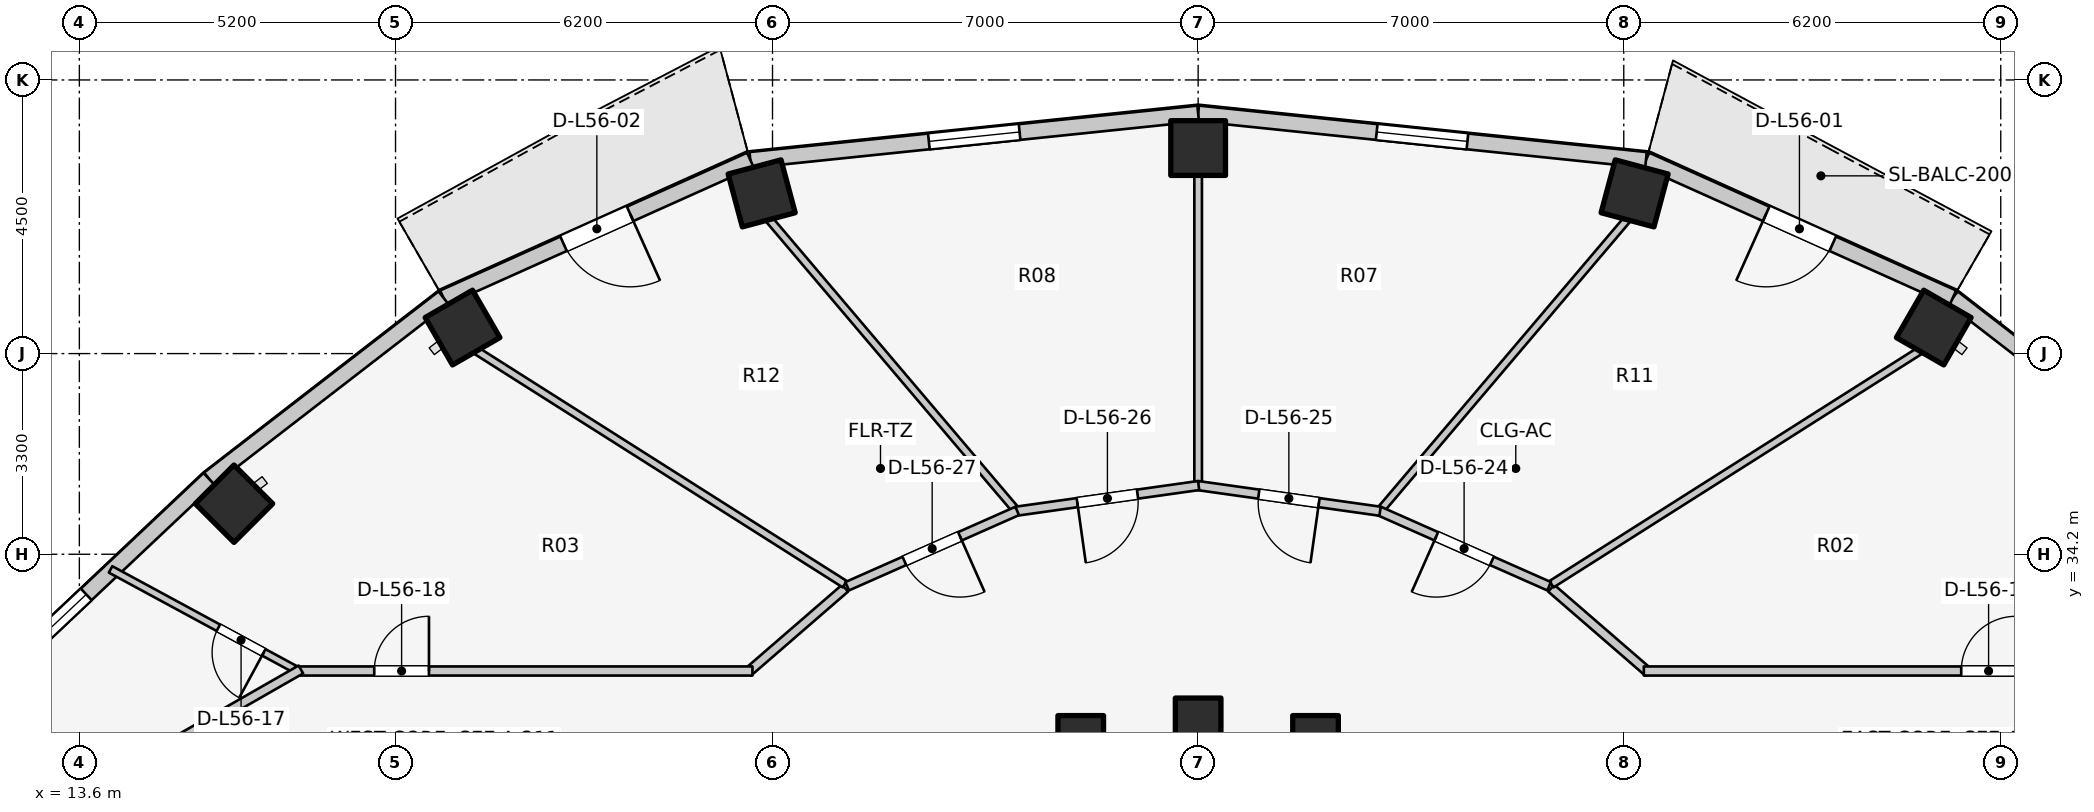
"""IFC4 building model, lengths in metres.
Left out: names, types, materials, properties, quantities, classifications, styles, units other than length and angle.
Written with IfcOpenShell. Run it as: python <this file> out.ifc"""

import sys

from ifc_helpers import new_model, si_unit, direction, frame, frame_2d, origin, origin_2d, place, context, subcontext, project, spatial, rectangle, extrude, element, fill, save


model = new_model("IFC4")
c1 = context("Model", 3, precision=1e-05, world=origin(), true_north=direction((0.0, 1.0)))
c2 = subcontext(c1, "Body", "Model", "MODEL_VIEW")
j1 = project(units=[si_unit("LENGTHUNIT", "METRE"), si_unit("PLANEANGLEUNIT", "RADIAN")], contexts=[c1])
p1 = place(None, origin())
s1 = spatial("IfcSite", under=j1, at=p1, CompositionType="ELEMENT")
p2 = place(p1, origin())
s2 = spatial("IfcBuilding", under=s1, at=p2, CompositionType="ELEMENT")
p3 = place(p2, frame((0.0, 0.0, 183.9)))
s3 = spatial("IfcBuildingStorey", under=s2, at=p3, CompositionType="ELEMENT", Elevation=183.9)
p4 = place(p3, frame((44.098, 37.928, 0.0), z_axis=(0.0, 0.0, 1.0), x_axis=(0.5, 0.866025403784, 0.0)))
e1 = element("IfcColumn", 1, at=p4, inside=s3, PredefinedType="COLUMN", context=c2, shape_type="SweptSolid", body=[
    extrude(rectangle(XDim=0.9, YDim=0.9, at=origin_2d()), origin(), (0.0, 0.0, 1.0), 3.1),
])
p5 = place(p3, frame((33.931, 31.172, 0.0), z_axis=(0.0, 0.0, 1.0), x_axis=(1.0, 0.0, 0.0)))
e2 = element("IfcColumn", 2, at=p5, inside=s3, PredefinedType="COLUMN", context=c2, shape_type="SweptSolid", body=[
    extrude(rectangle(XDim=0.75, YDim=0.75, at=origin_2d()), origin(), (0.0, 0.0, 1.0), 3.1),
])
p6 = place(p3, frame((39.178, 40.135, 0.0), z_axis=(0.0, 0.0, 1.0), x_axis=(0.258819045103, 0.965925826289, 0.0)))
e3 = element("IfcColumn", 3, at=p6, inside=s3, PredefinedType="COLUMN", context=c2, shape_type="SweptSolid", body=[
    extrude(rectangle(XDim=0.9, YDim=0.9, at=origin_2d()), origin(), (0.0, 0.0, 1.0), 3.1),
])
p7 = place(p3, frame((32.0, 31.46, 0.0), z_axis=(0.0, 0.0, 1.0), x_axis=(1.0, 0.0, 0.0)))
e4 = element("IfcColumn", 4, at=p7, inside=s3, PredefinedType="COLUMN", context=c2, shape_type="SweptSolid", body=[
    extrude(rectangle(XDim=0.75, YDim=0.75, at=origin_2d()), origin(), (0.0, 0.0, 1.0), 3.1),
])
p8 = place(p3, frame((32.0, 40.88, 0.0), z_axis=(0.0, 0.0, 1.0), x_axis=(0.0, 1.0, 0.0)))
e5 = element("IfcColumn", 5, at=p8, inside=s3, PredefinedType="COLUMN", context=c2, shape_type="SweptSolid", body=[
    extrude(rectangle(XDim=0.9, YDim=0.9, at=origin_2d()), origin(), (0.0, 0.0, 1.0), 3.1),
])
p9 = place(p3, frame((30.069, 31.172, 0.0), z_axis=(0.0, 0.0, 1.0), x_axis=(1.0, 0.0, 0.0)))
e6 = element("IfcColumn", 6, at=p9, inside=s3, PredefinedType="COLUMN", context=c2, shape_type="SweptSolid", body=[
    extrude(rectangle(XDim=0.75, YDim=0.75, at=origin_2d()), origin(), (0.0, 0.0, 1.0), 3.1),
])
for number, where, z_axis, x_axis in (
    (7, (24.822, 40.135, 0.0), (0.0, 0.0, 1.0), (-0.259, 0.966, 0.0)),
    (8, (19.902, 37.928, 0.0), (0.0, 0.0, 1.0), (-0.5, 0.866, 0.0)),
    (9, (16.143, 35.031, 0.0), (0.0, 0.0, 1.0), (-0.707, 0.707, 0.0)),
):
    element("IfcColumn", number, at=place(p3, frame(where, z_axis=z_axis, x_axis=x_axis)), inside=s3, PredefinedType="COLUMN", context=c2, shape_type="SweptSolid", body=[
        extrude(rectangle(XDim=0.9, YDim=0.9, at=origin_2d()), origin(), (0.0, 0.0, 1.0), 3.1),
    ])
p10 = place(p3, frame((48.269, 35.441, 0.0), z_axis=(0.0, 0.0, 1.0), x_axis=(-0.791460185804, 0.611220724687, 0.0)))
e10 = element("IfcWall", 10, at=p10, inside=s3, PredefinedType="STANDARD", context=c2, shape_type="SweptSolid", body=[
    extrude(rectangle(XDim=4.872, YDim=0.26, at=frame_2d((2.436, 0.0))), origin(), (0.0, 0.0, 1.0), 2.85),
])
p11 = place(p3, frame((44.413, 38.419, 0.0), z_axis=(0.0, 0.0, 1.0), x_axis=(-0.912353637112, 0.409403029847, 0.0)))
e11 = element("IfcWall", 11, at=p11, inside=s3, PredefinedType="STANDARD", context=c2, shape_type="SweptSolid", body=[
    extrude(rectangle(XDim=5.533, YDim=0.26, at=frame_2d((2.766, 0.0))), origin(), (0.0, 0.0, 1.0), 2.88),
])
p12 = place(p11, frame((2.167, 0.0, 0.0)))
e12 = element("IfcOpeningElement", 12, at=p12, cuts=e11, PredefinedType="OPENING", context=c2, shape_type="SweptSolid", body=[
    extrude(rectangle(XDim=1.2, YDim=2.2, at=frame_2d((0.6, 1.1))), frame((0.0, 0.14, 0.0), z_axis=(0.0, -1.0, 0.0), x_axis=(1.0, 0.0, 0.0)), (0.0, 0.0, 1.0), 0.28),
])
p13 = place(p3, frame((39.365, 40.685, 0.0), z_axis=(0.0, 0.0, 1.0), x_axis=(-0.994664178965, 0.10316574569, 0.0)))
e13 = element("IfcWall", 13, at=p13, inside=s3, PredefinedType="STANDARD", context=c2, shape_type="SweptSolid", body=[
    extrude(rectangle(XDim=7.405, YDim=0.26, at=frame_2d((3.702, 0.0))), origin(), (0.0, 0.0, 1.0), 2.85),
])
p14 = place(p13, frame((2.952, 0.0, 0.75)))
e14 = element("IfcOpeningElement", 14, at=p14, cuts=e13, PredefinedType="OPENING", context=c2, shape_type="SweptSolid", body=[
    extrude(rectangle(XDim=1.5, YDim=1.6, at=frame_2d((0.75, 0.8))), frame((0.0, 0.14, 0.0), z_axis=(0.0, -1.0, 0.0), x_axis=(1.0, 0.0, 0.0)), (0.0, 0.0, 1.0), 0.28),
])
p15 = place(p3, frame((32.0, 41.448, 0.0), z_axis=(0.0, 0.0, 1.0), x_axis=(-0.994664178965, -0.10316574569, 0.0)))
e15 = element("IfcWall", 15, at=p15, inside=s3, PredefinedType="STANDARD", context=c2, shape_type="SweptSolid", body=[
    extrude(rectangle(XDim=7.405, YDim=0.26, at=frame_2d((3.702, 0.0))), origin(), (0.0, 0.0, 1.0), 2.85),
])
p16 = place(p15, frame((2.952, 0.0, 0.75)))
e16 = element("IfcOpeningElement", 16, at=p16, cuts=e15, PredefinedType="OPENING", context=c2, shape_type="SweptSolid", body=[
    extrude(rectangle(XDim=1.5, YDim=1.6, at=frame_2d((0.75, 0.8))), frame((0.0, 0.14, 0.0), z_axis=(0.0, -1.0, 0.0), x_axis=(1.0, 0.0, 0.0)), (0.0, 0.0, 1.0), 0.28),
])
p17 = place(p3, frame((24.635, 40.685, 0.0), z_axis=(0.0, 0.0, 1.0), x_axis=(-0.912353637112, -0.409403029847, 0.0)))
e17 = element("IfcWall", 17, at=p17, inside=s3, PredefinedType="STANDARD", context=c2, shape_type="SweptSolid", body=[
    extrude(rectangle(XDim=5.533, YDim=0.26, at=frame_2d((2.766, 0.0))), origin(), (0.0, 0.0, 1.0), 2.88),
])
p18 = place(p17, frame((2.167, 0.0, 0.0)))
e18 = element("IfcOpeningElement", 18, at=p18, cuts=e17, PredefinedType="OPENING", context=c2, shape_type="SweptSolid", body=[
    extrude(rectangle(XDim=1.2, YDim=2.2, at=frame_2d((0.6, 1.1))), frame((0.0, 0.14, 0.0), z_axis=(0.0, -1.0, 0.0), x_axis=(1.0, 0.0, 0.0)), (0.0, 0.0, 1.0), 0.28),
])
p19 = place(p3, frame((19.587, 38.419, 0.0), z_axis=(0.0, 0.0, 1.0), x_axis=(-0.791460185804, -0.611220724687, 0.0)))
e19 = element("IfcWall", 19, at=p19, inside=s3, PredefinedType="STANDARD", context=c2, shape_type="SweptSolid", body=[
    extrude(rectangle(XDim=4.872, YDim=0.26, at=frame_2d((2.436, 0.0))), origin(), (0.0, 0.0, 1.0), 2.85),
])
p20 = place(p3, frame((15.731, 35.441, 0.0), z_axis=(0.0, 0.0, 1.0), x_axis=(-0.727667301037, -0.68593024354, 0.0)))
e20 = element("IfcWall", 20, at=p20, inside=s3, PredefinedType="STANDARD", context=c2, shape_type="SweptSolid", body=[
    extrude(rectangle(XDim=4.604, YDim=0.26, at=frame_2d((2.302, 0.0))), origin(), (0.0, 0.0, 1.0), 2.85),
])
p21 = place(p20, frame((2.772, 0.0, 0.75)))
e21 = element("IfcOpeningElement", 21, at=p21, cuts=e20, PredefinedType="OPENING", context=c2, shape_type="SweptSolid", body=[
    extrude(rectangle(XDim=1.2, YDim=1.5, at=frame_2d((0.6, 0.75))), frame((0.0, 0.14, 0.0), z_axis=(0.0, -1.0, 0.0), x_axis=(1.0, 0.0, 0.0)), (0.0, 0.0, 1.0), 0.28),
])
p22 = place(p3, frame((37.807, 33.642, 0.0), z_axis=(0.0, 0.0, 1.0), x_axis=(0.756055312247, -0.654507727092, 0.0)))
e22 = element("IfcWall", 22, at=p22, inside=s3, PredefinedType="PARTITIONING", context=c2, shape_type="SweptSolid", body=[
    extrude(rectangle(XDim=2.111, YDim=0.15, at=frame_2d((1.055, 0.0))), origin(), (0.0, 0.0, 1.0), 2.299),
])
p23 = place(p3, frame((39.33, 32.28, 0.0), z_axis=(0.0, 0.0, 1.0), x_axis=(1.0, 0.0, 0.0)))
e23 = element("IfcWall", 23, at=p23, inside=s3, PredefinedType="PARTITIONING", context=c2, shape_type="SweptSolid", body=[
    extrude(rectangle(XDim=7.52, YDim=0.15, at=frame_2d((3.76, 0.0))), origin(), (0.0, 0.0, 1.0), 2.299),
])
p24 = place(p23, frame((5.22, 0.0, 0.0)))
e24 = element("IfcOpeningElement", 24, at=p24, cuts=e23, PredefinedType="OPENING", context=c2, shape_type="SweptSolid", body=[
    extrude(rectangle(XDim=0.9, YDim=2.1, at=frame_2d((0.45, 1.05))), frame((0.0, 0.085, 0.0), z_axis=(0.0, -1.0, 0.0), x_axis=(1.0, 0.0, 0.0)), (0.0, 0.0, 1.0), 0.17),
])
p25 = place(p3, frame((17.244, 32.256, 0.0), z_axis=(0.0, 0.0, 1.0), x_axis=(-0.879385297668, 0.476110804587, 0.0)))
e25 = element("IfcWall", 25, at=p25, inside=s3, PredefinedType="MOVABLE", context=c2, shape_type="SweptSolid", body=[
    extrude(rectangle(XDim=3.56, YDim=0.12, at=frame_2d((1.78, 0.0))), origin(), (0.0, 0.0, 1.0), 2.22),
])
p26 = place(p25, frame((0.694, 0.0, 0.0)))
e26 = element("IfcOpeningElement", 26, at=p26, cuts=e25, PredefinedType="OPENING", context=c2, shape_type="SweptSolid", body=[
    extrude(rectangle(XDim=0.85, YDim=2.05, at=frame_2d((0.425, 1.025))), frame((0.0, 0.07, 0.0), z_axis=(0.0, -1.0, 0.0), x_axis=(1.0, 0.0, 0.0)), (0.0, 0.0, 1.0), 0.14),
])
p27 = place(p3, frame((26.193, 33.642, 0.0), z_axis=(0.0, 0.0, 1.0), x_axis=(-0.756055312247, -0.654507727092, 0.0)))
e27 = element("IfcWall", 27, at=p27, inside=s3, PredefinedType="PARTITIONING", context=c2, shape_type="SweptSolid", body=[
    extrude(rectangle(XDim=2.111, YDim=0.15, at=frame_2d((1.055, 0.0))), origin(), (0.0, 0.0, 1.0), 2.299),
])
p28 = place(p3, frame((17.15, 32.28, 0.0), z_axis=(0.0, 0.0, 1.0), x_axis=(1.0, 0.0, 0.0)))
e28 = element("IfcWall", 28, at=p28, inside=s3, PredefinedType="PARTITIONING", context=c2, shape_type="SweptSolid", body=[
    extrude(rectangle(XDim=7.52, YDim=0.15, at=frame_2d((3.76, 0.0))), origin(), (0.0, 0.0, 1.0), 2.299),
])
p29 = place(p28, frame((1.3, 0.0, 0.0)))
e29 = element("IfcOpeningElement", 29, at=p29, cuts=e28, PredefinedType="OPENING", context=c2, shape_type="SweptSolid", body=[
    extrude(rectangle(XDim=0.9, YDim=2.1, at=frame_2d((0.45, 1.05))), frame((0.0, 0.085, 0.0), z_axis=(0.0, -1.0, 0.0), x_axis=(1.0, 0.0, 0.0)), (0.0, 0.0, 1.0), 0.17),
])
p30 = place(p3, frame((17.243, 32.305, 0.0), z_axis=(0.0, 0.0, 1.0), x_axis=(-0.867991349648, -0.496579315857, 0.0)))
e30 = element("IfcWall", 30, at=p30, inside=s3, PredefinedType="PARTITIONING", context=c2, shape_type="SweptSolid", body=[
    extrude(rectangle(XDim=2.567, YDim=0.15, at=frame_2d((1.283, 0.0))), origin(), (0.0, 0.0, 1.0), 2.22),
])
p31 = place(p3, frame((37.812, 33.708, 0.0), z_axis=(0.0, 0.0, 1.0), x_axis=(0.844640430122, 0.535334048799, 0.0)))
e31 = element("IfcWall", 31, at=p31, inside=s3, PredefinedType="PARTITIONING", context=c2, shape_type="SweptSolid", body=[
    extrude(rectangle(XDim=7.188, YDim=0.125, at=frame_2d((3.594, 0.0))), origin(), (0.0, 0.0, 1.0), 2.299),
])
p32 = place(p3, frame((35.02, 34.952, 0.0), z_axis=(0.0, 0.0, 1.0), x_axis=(0.647173462792, 0.762342776615, 0.0)))
e32 = element("IfcWall", 32, at=p32, inside=s3, PredefinedType="PARTITIONING", context=c2, shape_type="SweptSolid", body=[
    extrude(rectangle(XDim=6.253, YDim=0.125, at=frame_2d((3.127, 0.0))), origin(), (0.0, 0.0, 1.0), 2.299),
])
p33 = place(p3, frame((32.0, 35.385, 0.0), z_axis=(0.0, 0.0, 1.0), x_axis=(0.0, 1.0, 0.0)))
e33 = element("IfcWall", 33, at=p33, inside=s3, PredefinedType="PARTITIONING", context=c2, shape_type="SweptSolid", body=[
    extrude(rectangle(XDim=5.065, YDim=0.125, at=frame_2d((2.532, 0.0))), origin(), (0.0, 0.0, 1.0), 2.299),
])
p34 = place(p3, frame((28.98, 34.952, 0.0), z_axis=(0.0, 0.0, 1.0), x_axis=(-0.647173462792, 0.762342776615, 0.0)))
e34 = element("IfcWall", 34, at=p34, inside=s3, PredefinedType="PARTITIONING", context=c2, shape_type="SweptSolid", body=[
    extrude(rectangle(XDim=6.253, YDim=0.125, at=frame_2d((3.127, 0.0))), origin(), (0.0, 0.0, 1.0), 2.299),
])
p35 = place(p3, frame((26.188, 33.708, 0.0), z_axis=(0.0, 0.0, 1.0), x_axis=(-0.844640430122, 0.535334048799, 0.0)))
e35 = element("IfcWall", 35, at=p35, inside=s3, PredefinedType="PARTITIONING", context=c2, shape_type="SweptSolid", body=[
    extrude(rectangle(XDim=7.188, YDim=0.125, at=frame_2d((3.594, 0.0))), origin(), (0.0, 0.0, 1.0), 2.299),
])
p36 = place(p3, frame((37.772, 33.674, 0.0), z_axis=(0.0, 0.0, 1.0), x_axis=(-0.914324470734, 0.404982422108, 0.0)))
e36 = element("IfcWall", 36, at=p36, inside=s3, PredefinedType="PARTITIONING", context=c2, shape_type="SweptSolid", body=[
    extrude(rectangle(XDim=3.058, YDim=0.15, at=frame_2d((1.529, 0.0))), origin(), (0.0, 0.0, 1.0), 2.299),
])
p37 = place(p36, frame((1.029, 0.0, 0.0)))
e37 = element("IfcOpeningElement", 37, at=p37, cuts=e36, PredefinedType="OPENING", context=c2, shape_type="SweptSolid", body=[
    extrude(rectangle(XDim=1.0, YDim=2.1, at=frame_2d((0.5, 1.05))), frame((0.0, 0.085, 0.0), z_axis=(0.0, -1.0, 0.0), x_axis=(1.0, 0.0, 0.0)), (0.0, 0.0, 1.0), 0.17),
])
p38 = place(p3, frame((34.992, 34.908, 0.0), z_axis=(0.0, 0.0, 1.0), x_axis=(-0.990234341072, 0.139412875167, 0.0)))
e38 = element("IfcWall", 38, at=p38, inside=s3, PredefinedType="PARTITIONING", context=c2, shape_type="SweptSolid", body=[
    extrude(rectangle(XDim=3.03, YDim=0.15, at=frame_2d((1.515, 0.0))), origin(), (0.0, 0.0, 1.0), 2.299),
])
p39 = place(p38, frame((1.015, 0.0, 0.0)))
e39 = element("IfcOpeningElement", 39, at=p39, cuts=e38, PredefinedType="OPENING", context=c2, shape_type="SweptSolid", body=[
    extrude(rectangle(XDim=1.0, YDim=2.1, at=frame_2d((0.5, 1.05))), frame((0.0, 0.085, 0.0), z_axis=(0.0, -1.0, 0.0), x_axis=(1.0, 0.0, 0.0)), (0.0, 0.0, 1.0), 0.17),
])
p40 = place(p3, frame((32.008, 35.33, 0.0), z_axis=(0.0, 0.0, 1.0), x_axis=(-0.990234341072, -0.139412875167, 0.0)))
e40 = element("IfcWall", 40, at=p40, inside=s3, PredefinedType="PARTITIONING", context=c2, shape_type="SweptSolid", body=[
    extrude(rectangle(XDim=3.03, YDim=0.15, at=frame_2d((1.515, 0.0))), origin(), (0.0, 0.0, 1.0), 2.299),
])
p41 = place(p40, frame((1.015, 0.0, 0.0)))
e41 = element("IfcOpeningElement", 41, at=p41, cuts=e40, PredefinedType="OPENING", context=c2, shape_type="SweptSolid", body=[
    extrude(rectangle(XDim=1.0, YDim=2.1, at=frame_2d((0.5, 1.05))), frame((0.0, 0.085, 0.0), z_axis=(0.0, -1.0, 0.0), x_axis=(1.0, 0.0, 0.0)), (0.0, 0.0, 1.0), 0.17),
])
p42 = place(p3, frame((29.024, 34.912, 0.0), z_axis=(0.0, 0.0, 1.0), x_axis=(-0.914324470734, -0.404982422108, 0.0)))
e42 = element("IfcWall", 42, at=p42, inside=s3, PredefinedType="PARTITIONING", context=c2, shape_type="SweptSolid", body=[
    extrude(rectangle(XDim=3.058, YDim=0.15, at=frame_2d((1.529, 0.0))), origin(), (0.0, 0.0, 1.0), 2.299),
])
p43 = place(p42, frame((1.029, 0.0, 0.0)))
e43 = element("IfcOpeningElement", 43, at=p43, cuts=e42, PredefinedType="OPENING", context=c2, shape_type="SweptSolid", body=[
    extrude(rectangle(XDim=1.0, YDim=2.1, at=frame_2d((0.5, 1.05))), frame((0.0, 0.085, 0.0), z_axis=(0.0, -1.0, 0.0), x_axis=(1.0, 0.0, 0.0)), (0.0, 0.0, 1.0), 0.17),
])
p44 = place(p12, origin())
e44 = element("IfcDoor", 44, at=p44, inside=s3, OperationType="SINGLE_SWING_RIGHT", PredefinedType="DOOR", context=c2, shape_type="SweptSolid", body=[
    extrude(rectangle(XDim=1.2, YDim=2.2, at=frame_2d((0.6, 1.1))), frame((0.0, 0.025, 0.0), z_axis=(0.0, -1.0, 0.0), x_axis=(1.0, 0.0, 0.0)), (0.0, 0.0, 1.0), 0.05),
])
fill(e12, e44)
p45 = place(p14, origin())
e45 = element("IfcWindow", 45, at=p45, inside=s3, PartitioningType="SINGLE_PANEL", PredefinedType="WINDOW", context=c2, shape_type="SweptSolid", body=[
    extrude(rectangle(XDim=1.5, YDim=1.6, at=frame_2d((0.75, 0.8))), frame((0.0, 0.03, 0.0), z_axis=(0.0, -1.0, 0.0), x_axis=(1.0, 0.0, 0.0)), (0.0, 0.0, 1.0), 0.06),
])
fill(e14, e45)
p46 = place(p16, origin())
e46 = element("IfcWindow", 46, at=p46, inside=s3, PartitioningType="SINGLE_PANEL", PredefinedType="WINDOW", context=c2, shape_type="SweptSolid", body=[
    extrude(rectangle(XDim=1.5, YDim=1.6, at=frame_2d((0.75, 0.8))), frame((0.0, 0.03, 0.0), z_axis=(0.0, -1.0, 0.0), x_axis=(1.0, 0.0, 0.0)), (0.0, 0.0, 1.0), 0.06),
])
fill(e16, e46)
p47 = place(p18, origin())
e47 = element("IfcDoor", 47, at=p47, inside=s3, OperationType="SINGLE_SWING_LEFT", PredefinedType="DOOR", context=c2, shape_type="SweptSolid", body=[
    extrude(rectangle(XDim=1.2, YDim=2.2, at=frame_2d((0.6, 1.1))), frame((0.0, 0.025, 0.0), z_axis=(0.0, -1.0, 0.0), x_axis=(1.0, 0.0, 0.0)), (0.0, 0.0, 1.0), 0.05),
])
fill(e18, e47)
p48 = place(p21, origin())
e48 = element("IfcWindow", 48, at=p48, inside=s3, PartitioningType="SINGLE_PANEL", PredefinedType="WINDOW", context=c2, shape_type="SweptSolid", body=[
    extrude(rectangle(XDim=1.2, YDim=1.5, at=frame_2d((0.6, 0.75))), frame((0.0, 0.03, 0.0), z_axis=(0.0, -1.0, 0.0), x_axis=(1.0, 0.0, 0.0)), (0.0, 0.0, 1.0), 0.06),
])
fill(e21, e48)
p49 = place(p24, origin())
e49 = element("IfcDoor", 49, at=p49, inside=s3, OperationType="SINGLE_SWING_RIGHT", PredefinedType="DOOR", context=c2, shape_type="SweptSolid", body=[
    extrude(rectangle(XDim=0.9, YDim=2.1, at=frame_2d((0.45, 1.05))), frame((0.0, 0.025, 0.0), z_axis=(0.0, -1.0, 0.0), x_axis=(1.0, 0.0, 0.0)), (0.0, 0.0, 1.0), 0.05),
])
fill(e24, e49)
p50 = place(p26, origin())
e50 = element("IfcDoor", 50, at=p50, inside=s3, OperationType="SINGLE_SWING_LEFT", PredefinedType="DOOR", context=c2, shape_type="SweptSolid", body=[
    extrude(rectangle(XDim=0.85, YDim=2.05, at=frame_2d((0.425, 1.025))), frame((0.0, 0.025, 0.0), z_axis=(0.0, -1.0, 0.0), x_axis=(1.0, 0.0, 0.0)), (0.0, 0.0, 1.0), 0.05),
])
fill(e26, e50)
p51 = place(p29, origin())
e51 = element("IfcDoor", 51, at=p51, inside=s3, OperationType="SINGLE_SWING_RIGHT", PredefinedType="DOOR", context=c2, shape_type="SweptSolid", body=[
    extrude(rectangle(XDim=0.9, YDim=2.1, at=frame_2d((0.45, 1.05))), frame((0.0, 0.025, 0.0), z_axis=(0.0, -1.0, 0.0), x_axis=(1.0, 0.0, 0.0)), (0.0, 0.0, 1.0), 0.05),
])
fill(e29, e51)
p52 = place(p37, origin())
e52 = element("IfcDoor", 52, at=p52, inside=s3, OperationType="SINGLE_SWING_RIGHT", PredefinedType="DOOR", context=c2, shape_type="SweptSolid", body=[
    extrude(rectangle(XDim=1.0, YDim=2.1, at=frame_2d((0.5, 1.05))), frame((0.0, 0.025, 0.0), z_axis=(0.0, -1.0, 0.0), x_axis=(1.0, 0.0, 0.0)), (0.0, 0.0, 1.0), 0.05),
])
fill(e37, e52)
p53 = place(p39, origin())
e53 = element("IfcDoor", 53, at=p53, inside=s3, OperationType="SINGLE_SWING_LEFT", PredefinedType="DOOR", context=c2, shape_type="SweptSolid", body=[
    extrude(rectangle(XDim=1.0, YDim=2.1, at=frame_2d((0.5, 1.05))), frame((0.0, 0.025, 0.0), z_axis=(0.0, -1.0, 0.0), x_axis=(1.0, 0.0, 0.0)), (0.0, 0.0, 1.0), 0.05),
])
fill(e39, e53)
p54 = place(p41, origin())
e54 = element("IfcDoor", 54, at=p54, inside=s3, OperationType="SINGLE_SWING_RIGHT", PredefinedType="DOOR", context=c2, shape_type="SweptSolid", body=[
    extrude(rectangle(XDim=1.0, YDim=2.1, at=frame_2d((0.5, 1.05))), frame((0.0, 0.025, 0.0), z_axis=(0.0, -1.0, 0.0), x_axis=(1.0, 0.0, 0.0)), (0.0, 0.0, 1.0), 0.05),
])
fill(e41, e54)
p55 = place(p43, origin())
e55 = element("IfcDoor", 55, at=p55, inside=s3, OperationType="SINGLE_SWING_LEFT", PredefinedType="DOOR", context=c2, shape_type="SweptSolid", body=[
    extrude(rectangle(XDim=1.0, YDim=2.1, at=frame_2d((0.5, 1.05))), frame((0.0, 0.025, 0.0), z_axis=(0.0, -1.0, 0.0), x_axis=(1.0, 0.0, 0.0)), (0.0, 0.0, 1.0), 0.05),
])
fill(e43, e55)
save(model, sys.argv[1])
